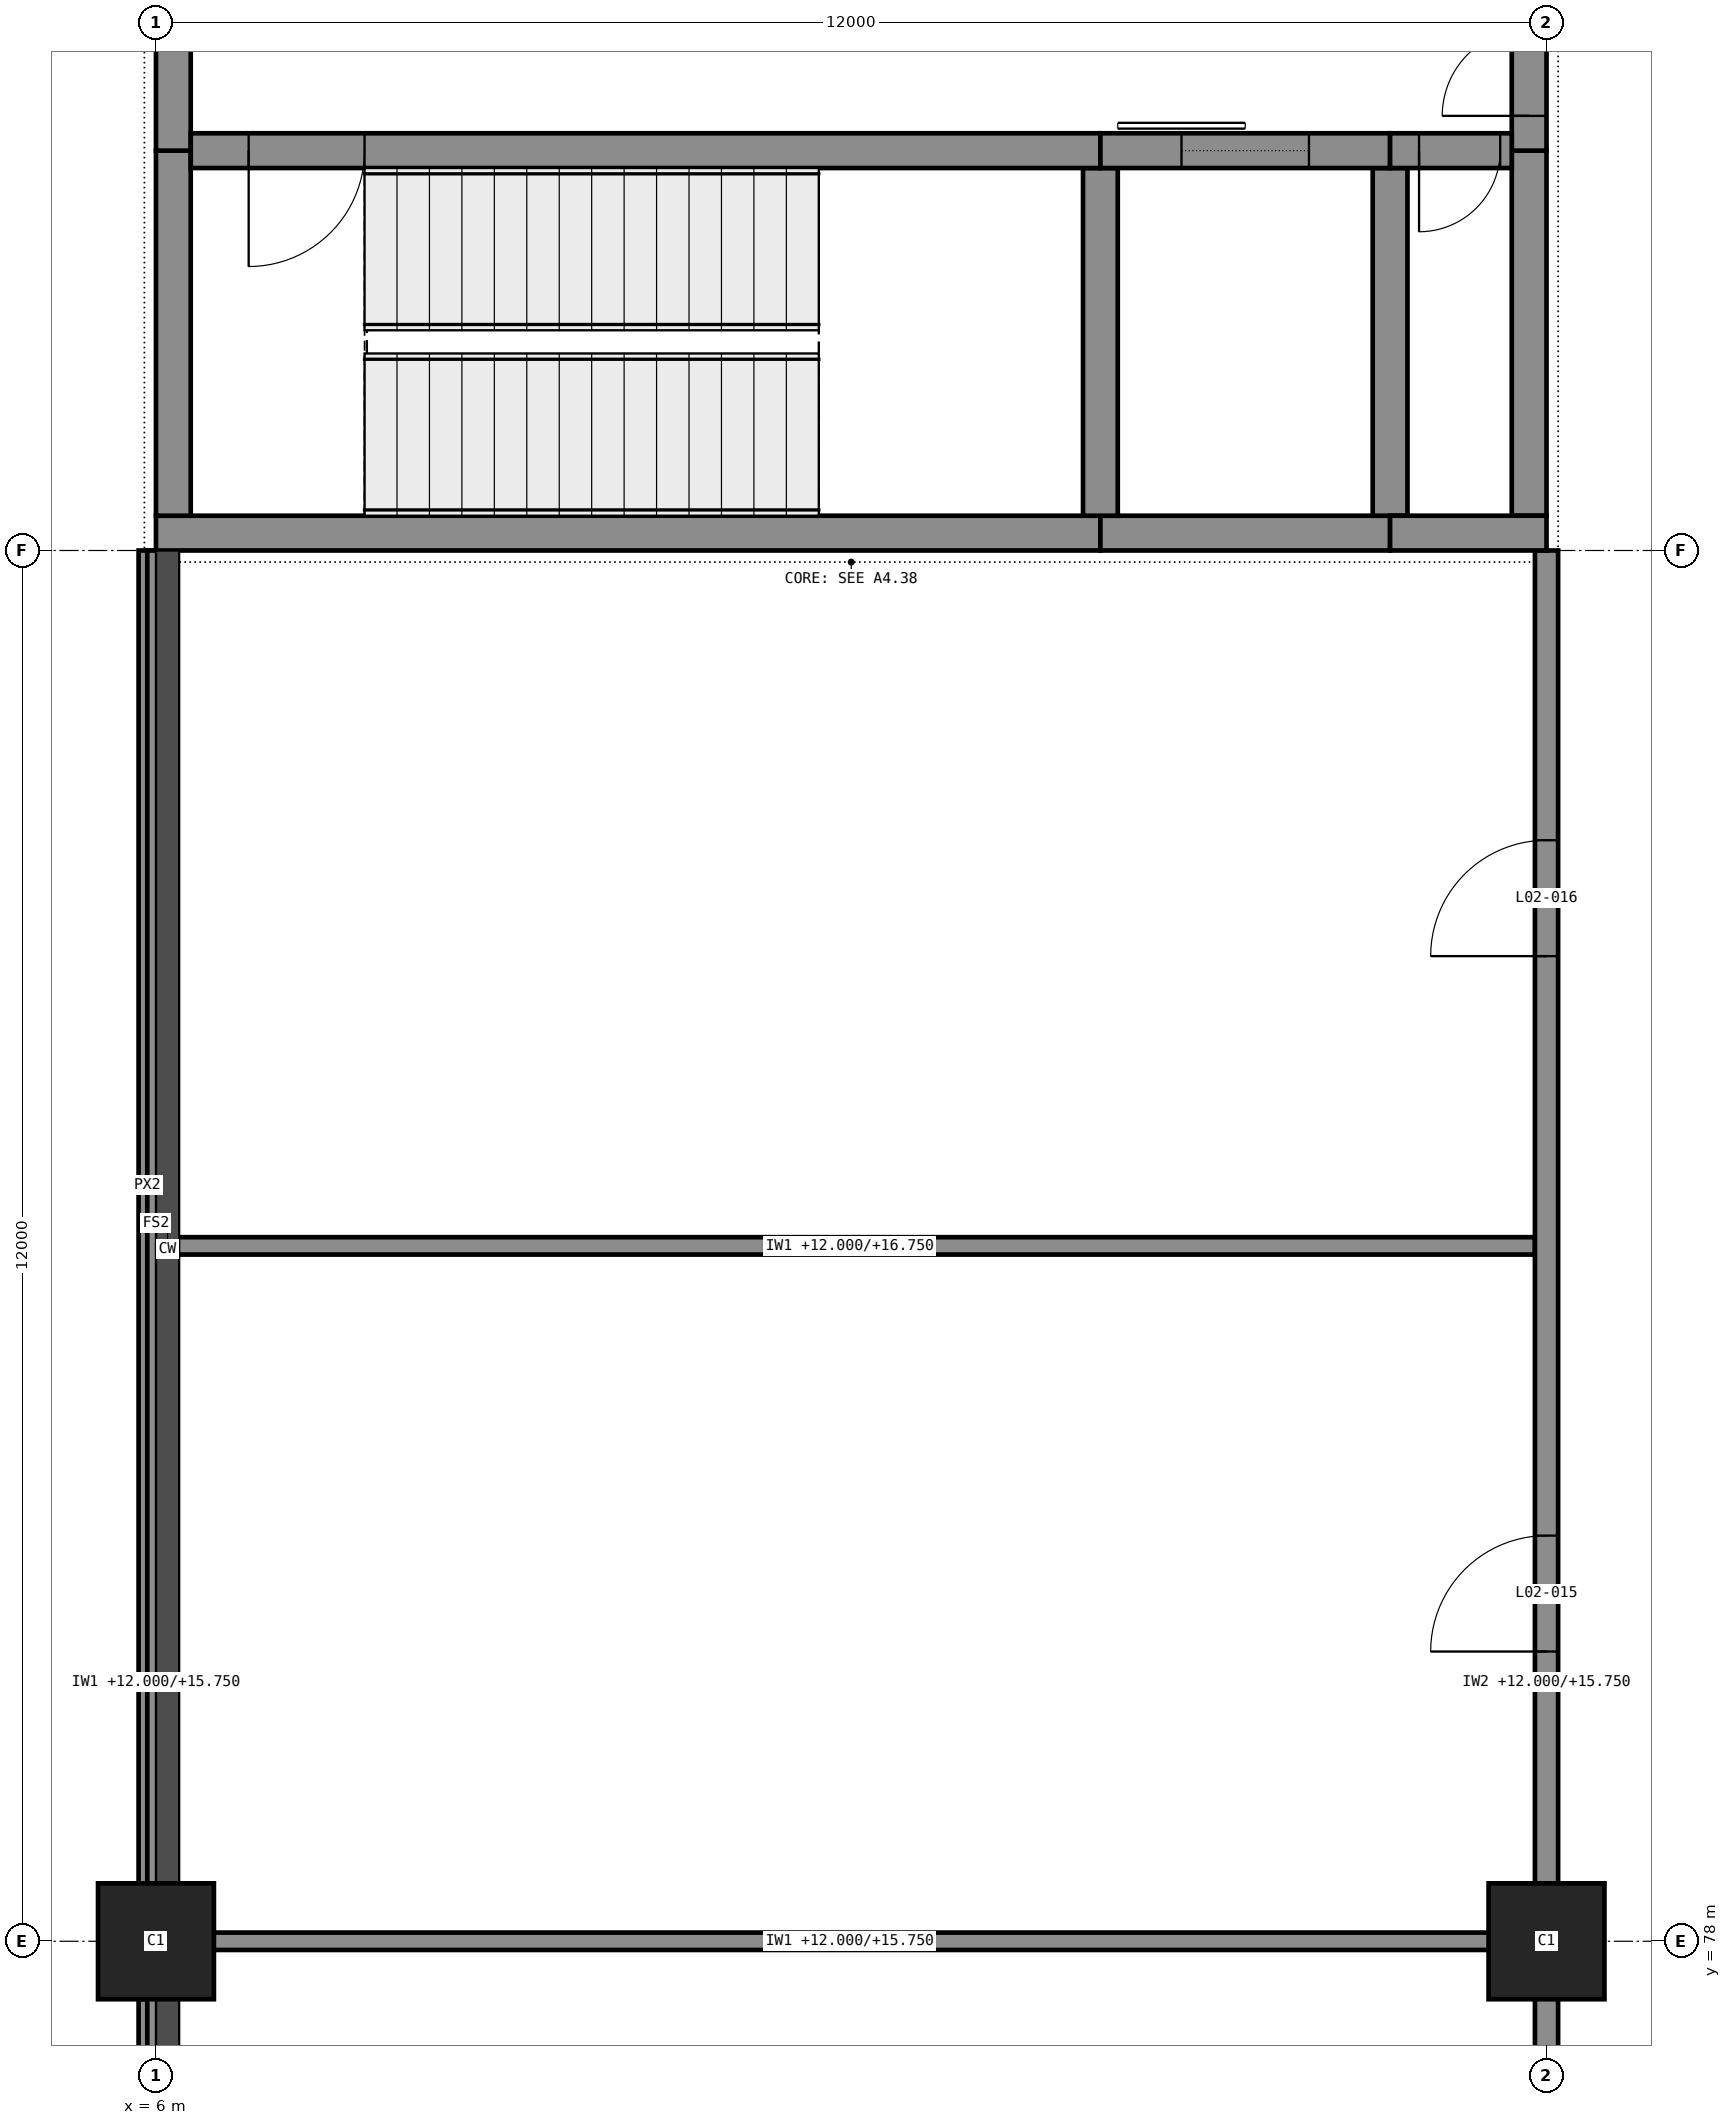
"""IFC4 building model, lengths in metres.
Left out: names, types, materials, properties, quantities, classifications, styles, units other than length and angle.
Written with IfcOpenShell. Run it as: python <this file> out.ifc"""

import sys

from ifc_helpers import new_model, si_unit, direction, frame, frame_2d, origin, origin_2d, place, context, subcontext, project, spatial, rectangle, extrude, element, fill, save


model = new_model("IFC4")
c1 = context("Model", 3, precision=1e-05, world=origin(), true_north=direction((0.0, 1.0)))
c2 = subcontext(c1, "Body", "Model", "MODEL_VIEW")
j1 = project(units=[si_unit("LENGTHUNIT", "METRE"), si_unit("PLANEANGLEUNIT", "RADIAN")], contexts=[c1])
p1 = place(None, origin())
s1 = spatial("IfcSite", under=j1, at=p1, CompositionType="ELEMENT")
p2 = place(p1, origin())
s2 = spatial("IfcBuilding", under=s1, at=p2, CompositionType="ELEMENT")
p3 = place(p2, frame((0.0, 0.0, 12.0)))
s3 = spatial("IfcBuildingStorey", under=s2, at=p3, CompositionType="ELEMENT", Elevation=12.0)
for number, where, z_axis, x_axis in (
    (1, (6.0, 78.0, 0.0), (0.0, 0.0, 1.0), (1.0, 0.0, 0.0)),
    (2, (18.0, 78.0, 0.0), (0.0, 0.0, 1.0), (1.0, 0.0, 0.0)),
):
    element("IfcColumn", number, at=place(p3, frame(where, z_axis=z_axis, x_axis=x_axis)), inside=s3, PredefinedType="COLUMN", context=c2, shape_type="SweptSolid", body=[
        extrude(rectangle(XDim=1.0, YDim=1.0, at=origin_2d()), origin(), (0.0, 0.0, 1.0), 5.0),
    ])
p4 = place(p3, frame((6.0, 90.15, 0.0), z_axis=(0.0, 0.0, 1.0), x_axis=(1.0, 0.0, 0.0)))
e3 = element("IfcWall", 3, at=p4, inside=s3, PredefinedType="SHEAR", context=c2, shape_type="SweptSolid", body=[
    extrude(rectangle(XDim=8.15, YDim=0.3, at=frame_2d((4.075, 0.0))), origin(), (0.0, 0.0, 1.0), 4.75),
])
p5 = place(p3, frame((14.15, 90.15, 0.0), z_axis=(0.0, 0.0, 1.0), x_axis=(1.0, 0.0, 0.0)))
e4 = element("IfcWall", 4, at=p5, inside=s3, PredefinedType="SHEAR", context=c2, shape_type="SweptSolid", body=[
    extrude(rectangle(XDim=2.5, YDim=0.3, at=frame_2d((1.25, 0.0))), origin(), (0.0, 0.0, 1.0), 4.75),
])
p6 = place(p3, frame((16.65, 90.15, 0.0), z_axis=(0.0, 0.0, 1.0), x_axis=(1.0, 0.0, 0.0)))
e5 = element("IfcWall", 5, at=p6, inside=s3, PredefinedType="SHEAR", context=c2, shape_type="SweptSolid", body=[
    extrude(rectangle(XDim=1.35, YDim=0.3, at=frame_2d((0.675, 0.0))), origin(), (0.0, 0.0, 1.0), 4.75),
])
p7 = place(p3, frame((6.3, 93.45, 0.0), z_axis=(0.0, 0.0, 1.0), x_axis=(1.0, 0.0, 0.0)))
e6 = element("IfcWall", 6, at=p7, inside=s3, PredefinedType="SHEAR", context=c2, shape_type="SweptSolid", body=[
    extrude(rectangle(XDim=7.85, YDim=0.3, at=frame_2d((3.925, 0.0))), origin(), (0.0, 0.0, 1.0), 4.75),
])
p8 = place(p7, frame((0.5, 0.0, 0.0)))
e7 = element("IfcOpeningElement", 7, at=p8, cuts=e6, PredefinedType="OPENING", context=c2, shape_type="SweptSolid", body=[
    extrude(rectangle(XDim=1.0, YDim=2.1, at=frame_2d((0.5, 1.05))), frame((0.0, 0.16, 0.0), z_axis=(0.0, -1.0, 0.0), x_axis=(1.0, 0.0, 0.0)), (0.0, 0.0, 1.0), 0.32),
])
p9 = place(p3, frame((14.15, 93.45, 0.0), z_axis=(0.0, 0.0, 1.0), x_axis=(1.0, 0.0, 0.0)))
e8 = element("IfcWall", 8, at=p9, inside=s3, PredefinedType="SHEAR", context=c2, shape_type="SweptSolid", body=[
    extrude(rectangle(XDim=2.5, YDim=0.3, at=frame_2d((1.25, 0.0))), origin(), (0.0, 0.0, 1.0), 4.75),
])
p10 = place(p9, frame((0.7, 0.0, 0.0)))
e9 = element("IfcOpeningElement", 9, at=p10, cuts=e8, PredefinedType="OPENING", context=c2, shape_type="SweptSolid", body=[
    extrude(rectangle(XDim=1.1, YDim=2.1, at=frame_2d((0.55, 1.05))), frame((0.0, 0.16, 0.0), z_axis=(0.0, -1.0, 0.0), x_axis=(1.0, 0.0, 0.0)), (0.0, 0.0, 1.0), 0.32),
])
p11 = place(p3, frame((16.65, 93.45, 0.0), z_axis=(0.0, 0.0, 1.0), x_axis=(1.0, 0.0, 0.0)))
e10 = element("IfcWall", 10, at=p11, inside=s3, PredefinedType="SHEAR", context=c2, shape_type="SweptSolid", body=[
    extrude(rectangle(XDim=1.05, YDim=0.3, at=frame_2d((0.525, 0.0))), origin(), (0.0, 0.0, 1.0), 4.75),
])
p12 = place(p11, frame((0.25, 0.0, 0.0)))
e11 = element("IfcOpeningElement", 11, at=p12, cuts=e10, PredefinedType="OPENING", context=c2, shape_type="SweptSolid", body=[
    extrude(rectangle(XDim=0.7, YDim=2.1, at=frame_2d((0.35, 1.05))), frame((0.0, 0.16, 0.0), z_axis=(0.0, -1.0, 0.0), x_axis=(1.0, 0.0, 0.0)), (0.0, 0.0, 1.0), 0.32),
])
p13 = place(p3, frame((6.15, 90.3, 0.0), z_axis=(0.0, 0.0, 1.0), x_axis=(0.0, 1.0, 0.0)))
e12 = element("IfcWall", 12, at=p13, inside=s3, PredefinedType="SHEAR", context=c2, shape_type="SweptSolid", body=[
    extrude(rectangle(XDim=3.15, YDim=0.3, at=frame_2d((1.575, 0.0))), origin(), (0.0, 0.0, 1.0), 4.75),
])
p14 = place(p3, frame((6.15, 93.45, 0.0), z_axis=(0.0, 0.0, 1.0), x_axis=(0.0, 1.0, 0.0)))
e13 = element("IfcWall", 13, at=p14, inside=s3, PredefinedType="SHEAR", context=c2, shape_type="SweptSolid", body=[
    extrude(rectangle(XDim=5.1, YDim=0.3, at=frame_2d((2.55, 0.0))), origin(), (0.0, 0.0, 1.0), 4.75),
])
p15 = place(p3, frame((17.85, 90.3, 0.0), z_axis=(0.0, 0.0, 1.0), x_axis=(0.0, 1.0, 0.0)))
e14 = element("IfcWall", 14, at=p15, inside=s3, PredefinedType="SHEAR", context=c2, shape_type="SweptSolid", body=[
    extrude(rectangle(XDim=3.15, YDim=0.3, at=frame_2d((1.575, 0.0))), origin(), (0.0, 0.0, 1.0), 4.75),
])
p16 = place(p3, frame((17.85, 93.45, 0.0), z_axis=(0.0, 0.0, 1.0), x_axis=(0.0, 1.0, 0.0)))
e15 = element("IfcWall", 15, at=p16, inside=s3, PredefinedType="SHEAR", context=c2, shape_type="SweptSolid", body=[
    extrude(rectangle(XDim=5.1, YDim=0.3, at=frame_2d((2.55, 0.0))), origin(), (0.0, 0.0, 1.0), 4.75),
])
p17 = place(p16, frame((0.3, 0.0, 0.0)))
e16 = element("IfcOpeningElement", 16, at=p17, cuts=e15, PredefinedType="OPENING", context=c2, shape_type="SweptSolid", body=[
    extrude(rectangle(XDim=1.5, YDim=2.1, at=frame_2d((0.75, 1.05))), frame((0.0, 0.16, 0.0), z_axis=(0.0, -1.0, 0.0), x_axis=(1.0, 0.0, 0.0)), (0.0, 0.0, 1.0), 0.32),
])
for number, where, z_axis, x_axis in (
    (17, (14.15, 90.3, 0.0), (0.0, 0.0, 1.0), (0.0, 1.0, 0.0)),
    (18, (16.65, 90.3, 0.0), (0.0, 0.0, 1.0), (0.0, 1.0, 0.0)),
):
    element("IfcWall", number, at=place(p3, frame(where, z_axis=z_axis, x_axis=x_axis)), inside=s3, PredefinedType="SHEAR", context=c2, shape_type="SweptSolid", body=[
        extrude(rectangle(XDim=3.0, YDim=0.3, at=frame_2d((1.5, 0.0))), origin(), (0.0, 0.0, 1.0), 4.75),
    ])
p18 = place(p3, frame((5.925, 90.0, 4.75), z_axis=(0.0, 0.0, 1.0), x_axis=(0.0, -1.0, 0.0)))
e19 = element("IfcWall", 19, at=p18, inside=s3, PredefinedType="STANDARD", context=c2, shape_type="SweptSolid", body=[
    extrude(rectangle(XDim=11.5, YDim=0.15, at=frame_2d((5.75, 0.0))), origin(), (0.0, 0.0, 1.0), 0.25),
])
p19 = place(p3, frame((5.925, 77.5, 4.75), z_axis=(0.0, 0.0, 1.0), x_axis=(0.0, -1.0, 0.0)))
e20 = element("IfcWall", 20, at=p19, inside=s3, PredefinedType="STANDARD", context=c2, shape_type="SweptSolid", body=[
    extrude(rectangle(XDim=11.0, YDim=0.15, at=frame_2d((5.5, 0.0))), origin(), (0.0, 0.0, 1.0), 0.25),
])
p20 = place(p3, frame((6.075, 78.0, 0.0), z_axis=(0.0, 0.0, 1.0), x_axis=(1.0, 0.0, 0.0)))
e21 = element("IfcWall", 21, at=p20, inside=s3, PredefinedType="PARTITIONING", context=c2, shape_type="SweptSolid", body=[
    extrude(rectangle(XDim=11.825, YDim=0.15, at=frame_2d((5.913, 0.0))), origin(), (0.0, 0.0, 1.0), 3.75),
])
p21 = place(p3, frame((6.075, 84.0, 0.0), z_axis=(0.0, 0.0, 1.0), x_axis=(1.0, 0.0, 0.0)))
e22 = element("IfcWall", 22, at=p21, inside=s3, PredefinedType="PARTITIONING", context=c2, shape_type="SweptSolid", body=[
    extrude(rectangle(XDim=11.825, YDim=0.15, at=frame_2d((5.913, 0.0))), origin(), (0.0, 0.0, 1.0), 4.75),
])
p22 = place(p3, frame((6.0, 54.0, 0.0), z_axis=(0.0, 0.0, 1.0), x_axis=(0.0, 1.0, 0.0)))
e23 = element("IfcWall", 23, at=p22, inside=s3, PredefinedType="PARTITIONING", context=c2, shape_type="SweptSolid", body=[
    extrude(rectangle(XDim=36.0, YDim=0.15, at=frame_2d((18.0, 0.0))), origin(), (0.0, 0.0, 1.0), 3.75),
])
p23 = place(p3, frame((18.0, 54.0, 0.0), z_axis=(0.0, 0.0, 1.0), x_axis=(0.0, 1.0, 0.0)))
e24 = element("IfcWall", 24, at=p23, inside=s3, PredefinedType="PARTITIONING", context=c2, shape_type="SweptSolid", body=[
    extrude(rectangle(XDim=36.0, YDim=0.2, at=frame_2d((18.0, 0.0))), origin(), (0.0, 0.0, 1.0), 3.75),
])
p24 = place(p23, frame((2.5, 0.0, 0.0)))
e25 = element("IfcOpeningElement", 25, at=p24, cuts=e24, PredefinedType="OPENING", context=c2, shape_type="SweptSolid", body=[
    extrude(rectangle(XDim=1.0, YDim=2.1, at=frame_2d((0.5, 1.05))), frame((0.0, 0.11, 0.0), z_axis=(0.0, -1.0, 0.0), x_axis=(1.0, 0.0, 0.0)), (0.0, 0.0, 1.0), 0.22),
])
p25 = place(p23, frame((8.5, 0.0, 0.0)))
e26 = element("IfcOpeningElement", 26, at=p25, cuts=e24, PredefinedType="OPENING", context=c2, shape_type="SweptSolid", body=[
    extrude(rectangle(XDim=1.0, YDim=2.1, at=frame_2d((0.5, 1.05))), frame((0.0, 0.11, 0.0), z_axis=(0.0, -1.0, 0.0), x_axis=(1.0, 0.0, 0.0)), (0.0, 0.0, 1.0), 0.22),
])
p26 = place(p23, frame((14.5, 0.0, 0.0)))
e27 = element("IfcOpeningElement", 27, at=p26, cuts=e24, PredefinedType="OPENING", context=c2, shape_type="SweptSolid", body=[
    extrude(rectangle(XDim=1.0, YDim=2.1, at=frame_2d((0.5, 1.05))), frame((0.0, 0.11, 0.0), z_axis=(0.0, -1.0, 0.0), x_axis=(1.0, 0.0, 0.0)), (0.0, 0.0, 1.0), 0.22),
])
p27 = place(p23, frame((20.5, 0.0, 0.0)))
e28 = element("IfcOpeningElement", 28, at=p27, cuts=e24, PredefinedType="OPENING", context=c2, shape_type="SweptSolid", body=[
    extrude(rectangle(XDim=1.0, YDim=2.1, at=frame_2d((0.5, 1.05))), frame((0.0, 0.11, 0.0), z_axis=(0.0, -1.0, 0.0), x_axis=(1.0, 0.0, 0.0)), (0.0, 0.0, 1.0), 0.22),
])
p28 = place(p23, frame((26.5, 0.0, 0.0)))
e29 = element("IfcOpeningElement", 29, at=p28, cuts=e24, PredefinedType="OPENING", context=c2, shape_type="SweptSolid", body=[
    extrude(rectangle(XDim=1.0, YDim=2.1, at=frame_2d((0.5, 1.05))), frame((0.0, 0.11, 0.0), z_axis=(0.0, -1.0, 0.0), x_axis=(1.0, 0.0, 0.0)), (0.0, 0.0, 1.0), 0.22),
])
p29 = place(p23, frame((32.5, 0.0, 0.0)))
e30 = element("IfcOpeningElement", 30, at=p29, cuts=e24, PredefinedType="OPENING", context=c2, shape_type="SweptSolid", body=[
    extrude(rectangle(XDim=1.0, YDim=2.1, at=frame_2d((0.5, 1.05))), frame((0.0, 0.11, 0.0), z_axis=(0.0, -1.0, 0.0), x_axis=(1.0, 0.0, 0.0)), (0.0, 0.0, 1.0), 0.22),
])
p30 = place(p28, origin())
e31 = element("IfcDoor", 31, at=p30, inside=s3, OperationType="SINGLE_SWING_RIGHT", PredefinedType="DOOR", context=c2, shape_type="SweptSolid", body=[
    extrude(rectangle(XDim=1.0, YDim=2.1, at=frame_2d((0.5, 1.05))), frame((0.0, 0.025, 0.0), z_axis=(0.0, -1.0, 0.0), x_axis=(1.0, 0.0, 0.0)), (0.0, 0.0, 1.0), 0.05),
])
fill(e29, e31)
p31 = place(p29, origin())
e32 = element("IfcDoor", 32, at=p31, inside=s3, OperationType="SINGLE_SWING_RIGHT", PredefinedType="DOOR", context=c2, shape_type="SweptSolid", body=[
    extrude(rectangle(XDim=1.0, YDim=2.1, at=frame_2d((0.5, 1.05))), frame((0.0, 0.025, 0.0), z_axis=(0.0, -1.0, 0.0), x_axis=(1.0, 0.0, 0.0)), (0.0, 0.0, 1.0), 0.05),
])
fill(e30, e32)
p32 = place(p8, frame((1.0, 0.0, 0.0), z_axis=(0.0, 0.0, 1.0), x_axis=(-1.0, 0.0, 0.0)))
e33 = element("IfcDoor", 33, at=p32, inside=s3, OperationType="SINGLE_SWING_LEFT", PredefinedType="DOOR", context=c2, shape_type="SweptSolid", body=[
    extrude(rectangle(XDim=1.0, YDim=2.1, at=frame_2d((0.5, 1.05))), frame((0.0, 0.025, 0.0), z_axis=(0.0, -1.0, 0.0), x_axis=(1.0, 0.0, 0.0)), (0.0, 0.0, 1.0), 0.05),
])
fill(e7, e33)
p33 = place(p10, origin())
e34 = element("IfcDoor", 34, at=p33, inside=s3, OperationType="SLIDING_TO_LEFT", PredefinedType="DOOR", context=c2, shape_type="SweptSolid", body=[
    extrude(rectangle(XDim=1.1, YDim=2.1, at=frame_2d((0.55, 1.05))), frame((0.0, 0.025, 0.0), z_axis=(0.0, -1.0, 0.0), x_axis=(1.0, 0.0, 0.0)), (0.0, 0.0, 1.0), 0.05),
])
fill(e9, e34)
p34 = place(p12, frame((0.7, 0.0, 0.0), z_axis=(0.0, 0.0, 1.0), x_axis=(-1.0, 0.0, 0.0)))
e35 = element("IfcDoor", 35, at=p34, inside=s3, OperationType="SINGLE_SWING_LEFT", PredefinedType="DOOR", context=c2, shape_type="SweptSolid", body=[
    extrude(rectangle(XDim=0.7, YDim=2.1, at=frame_2d((0.35, 1.05))), frame((0.0, 0.025, 0.0), z_axis=(0.0, -1.0, 0.0), x_axis=(1.0, 0.0, 0.0)), (0.0, 0.0, 1.0), 0.05),
])
fill(e11, e35)
p35 = place(p17, origin())
e36 = element("IfcDoor", 36, at=p35, inside=s3, OperationType="DOUBLE_DOOR_SINGLE_SWING", PredefinedType="DOOR", context=c2, shape_type="SweptSolid", body=[
    extrude(rectangle(XDim=1.5, YDim=2.1, at=frame_2d((0.75, 1.05))), frame((0.0, 0.025, 0.0), z_axis=(0.0, -1.0, 0.0), x_axis=(1.0, 0.0, 0.0)), (0.0, 0.0, 1.0), 0.05),
])
fill(e16, e36)
save(model, sys.argv[1])
